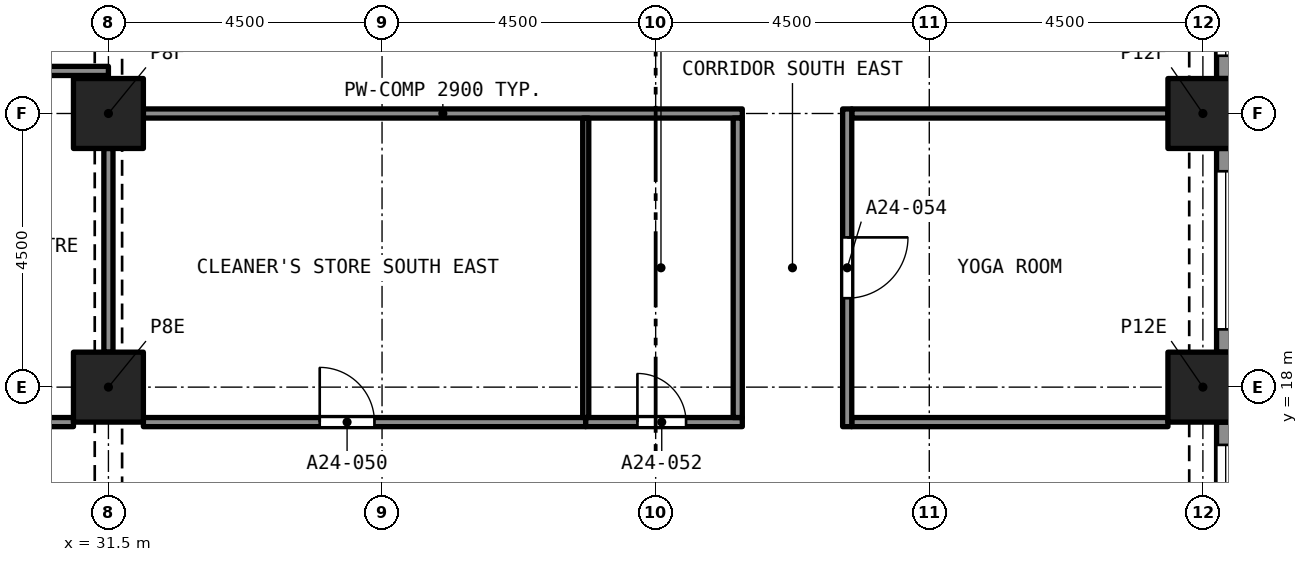
"""IFC4 building model, lengths in metres.
Left out: names, types, materials, properties, quantities, classifications, styles, units other than length and angle.
Written with IfcOpenShell. Run it as: python <this file> out.ifc"""

import sys

from ifc_helpers import new_model, si_unit, direction, frame, frame_2d, origin, origin_2d, place, context, subcontext, project, spatial, rectangle, extrude, element, fill, save


model = new_model("IFC4")
c1 = context("Model", 3, precision=1e-05, world=origin(), true_north=direction((0.0, 1.0)))
c2 = subcontext(c1, "Body", "Model", "MODEL_VIEW")
j1 = project(units=[si_unit("LENGTHUNIT", "METRE"), si_unit("PLANEANGLEUNIT", "RADIAN")], contexts=[c1])
p1 = place(None, origin())
s1 = spatial("IfcSite", under=j1, at=p1, CompositionType="ELEMENT")
p2 = place(p1, origin())
s2 = spatial("IfcBuilding", under=s1, at=p2, CompositionType="ELEMENT")
p3 = place(p2, frame((0.0, 0.0, 89.6)))
s3 = spatial("IfcBuildingStorey", under=s2, at=p3, CompositionType="ELEMENT", Elevation=89.6)
for number, where, z_axis, x_axis in (
    (1, (31.5, 18.0, 0.0), (0.0, 0.0, 1.0), (1.0, 0.0, 0.0)),
    (2, (49.5, 18.0, 0.0), (0.0, 0.0, 1.0), (1.0, 0.0, 0.0)),
    (3, (31.5, 22.5, 0.0), (0.0, 0.0, 1.0), (1.0, 0.0, 0.0)),
    (4, (49.5, 22.5, 0.0), (0.0, 0.0, 1.0), (1.0, 0.0, 0.0)),
):
    element("IfcColumn", number, at=place(p3, frame(where, z_axis=z_axis, x_axis=x_axis)), inside=s3, PredefinedType="COLUMN", context=c2, shape_type="SweptSolid", body=[
        extrude(rectangle(XDim=1.15, YDim=1.15, at=origin_2d()), origin(), (0.0, 0.0, 1.0), 3.2),
    ])
p4 = place(p3, frame((49.875, 17.425, 0.0), z_axis=(0.0, 0.0, 1.0), x_axis=(0.0, -1.0, 0.0)))
e5 = element("IfcWall", 5, at=p4, inside=s3, PredefinedType="SOLIDWALL", context=c2, shape_type="SweptSolid", body=[
    extrude(rectangle(XDim=3.35, YDim=0.3, at=frame_2d((1.675, 0.0))), origin(), (0.0, 0.0, 1.0), 3.2),
])
p5 = place(p4, frame((0.375, 0.0, 0.45)))
e6 = element("IfcOpeningElement", 6, at=p5, cuts=e5, PredefinedType="OPENING", context=c2, shape_type="SweptSolid", body=[
    extrude(rectangle(XDim=2.6, YDim=1.95, at=frame_2d((1.3, 0.975))), frame((0.0, 0.16, 0.0), z_axis=(0.0, -1.0, 0.0), x_axis=(1.0, 0.0, 0.0)), (0.0, 0.0, 1.0), 0.32),
])
p6 = place(p3, frame((49.875, 21.925, 0.0), z_axis=(0.0, 0.0, 1.0), x_axis=(0.0, -1.0, 0.0)))
e7 = element("IfcWall", 7, at=p6, inside=s3, PredefinedType="SOLIDWALL", context=c2, shape_type="SweptSolid", body=[
    extrude(rectangle(XDim=3.35, YDim=0.3, at=frame_2d((1.675, 0.0))), origin(), (0.0, 0.0, 1.0), 3.2),
])
p7 = place(p6, frame((0.375, 0.0, 0.45)))
e8 = element("IfcOpeningElement", 8, at=p7, cuts=e7, PredefinedType="OPENING", context=c2, shape_type="SweptSolid", body=[
    extrude(rectangle(XDim=2.6, YDim=1.95, at=frame_2d((1.3, 0.975))), frame((0.0, 0.16, 0.0), z_axis=(0.0, -1.0, 0.0), x_axis=(1.0, 0.0, 0.0)), (0.0, 0.0, 1.0), 0.32),
])
p8 = place(p3, frame((49.875, 26.425, 0.0), z_axis=(0.0, 0.0, 1.0), x_axis=(0.0, -1.0, 0.0)))
e9 = element("IfcWall", 9, at=p8, inside=s3, PredefinedType="SOLIDWALL", context=c2, shape_type="SweptSolid", body=[
    extrude(rectangle(XDim=3.35, YDim=0.3, at=frame_2d((1.675, 0.0))), origin(), (0.0, 0.0, 1.0), 3.2),
])
p9 = place(p8, frame((0.375, 0.0, 0.45)))
e10 = element("IfcOpeningElement", 10, at=p9, cuts=e9, PredefinedType="OPENING", context=c2, shape_type="SweptSolid", body=[
    extrude(rectangle(XDim=2.6, YDim=1.95, at=frame_2d((1.3, 0.975))), frame((0.0, 0.16, 0.0), z_axis=(0.0, -1.0, 0.0), x_axis=(1.0, 0.0, 0.0)), (0.0, 0.0, 1.0), 0.32),
])
p10 = place(p3, frame((25.725, 17.425, 0.0), z_axis=(0.0, 0.0, 1.0), x_axis=(1.0, 0.0, 0.0)))
e11 = element("IfcWall", 11, at=p10, inside=s3, PredefinedType="PARTITIONING", context=c2, shape_type="SweptSolid", body=[
    extrude(rectangle(XDim=5.2, YDim=0.15, at=frame_2d((2.6, 0.0))), origin(), (0.0, 0.0, 1.0), 2.75),
])
p11 = place(p3, frame((32.075, 17.425, 0.0), z_axis=(0.0, 0.0, 1.0), x_axis=(1.0, 0.0, 0.0)))
e12 = element("IfcWall", 12, at=p11, inside=s3, PredefinedType="PARTITIONING", context=c2, shape_type="SweptSolid", body=[
    extrude(rectangle(XDim=7.275, YDim=0.15, at=frame_2d((3.638, 0.0))), origin(), (0.0, 0.0, 1.0), 2.9),
])
p12 = place(p11, frame((2.9, 0.0, 0.0)))
e13 = element("IfcOpeningElement", 13, at=p12, cuts=e12, PredefinedType="OPENING", context=c2, shape_type="SweptSolid", body=[
    extrude(rectangle(XDim=0.9, YDim=2.1, at=frame_2d((0.45, 1.05))), frame((0.0, 0.085, 0.0), z_axis=(0.0, -1.0, 0.0), x_axis=(1.0, 0.0, 0.0)), (0.0, 0.0, 1.0), 0.17),
])
p13 = place(p3, frame((39.35, 17.425, 0.0), z_axis=(0.0, 0.0, 1.0), x_axis=(1.0, 0.0, 0.0)))
e14 = element("IfcWall", 14, at=p13, inside=s3, PredefinedType="PARTITIONING", context=c2, shape_type="SweptSolid", body=[
    extrude(rectangle(XDim=2.575, YDim=0.15, at=frame_2d((1.288, 0.0))), origin(), (0.0, 0.0, 1.0), 2.9),
])
p14 = place(p13, frame((0.85, 0.0, 0.0)))
e15 = element("IfcOpeningElement", 15, at=p14, cuts=e14, PredefinedType="OPENING", context=c2, shape_type="SweptSolid", body=[
    extrude(rectangle(XDim=0.8, YDim=2.1, at=frame_2d((0.4, 1.05))), frame((0.0, 0.085, 0.0), z_axis=(0.0, -1.0, 0.0), x_axis=(1.0, 0.0, 0.0)), (0.0, 0.0, 1.0), 0.17),
])
p15 = place(p3, frame((43.725, 17.425, 0.0), z_axis=(0.0, 0.0, 1.0), x_axis=(1.0, 0.0, 0.0)))
e16 = element("IfcWall", 16, at=p15, inside=s3, PredefinedType="PARTITIONING", context=c2, shape_type="SweptSolid", body=[
    extrude(rectangle(XDim=5.2, YDim=0.15, at=frame_2d((2.6, 0.0))), origin(), (0.0, 0.0, 1.0), 2.9),
])
p16 = place(p3, frame((25.725, 23.2, 0.0), z_axis=(0.0, 0.0, 1.0), x_axis=(1.0, 0.0, 0.0)))
e17 = element("IfcWall", 17, at=p16, inside=s3, PredefinedType="PARTITIONING", context=c2, shape_type="SweptSolid", body=[
    extrude(rectangle(XDim=5.775, YDim=0.15, at=frame_2d((2.887, 0.0))), origin(), (0.0, 0.0, 1.0), 2.75),
])
p17 = place(p3, frame((31.5, 18.575, 0.0), z_axis=(0.0, 0.0, 1.0), x_axis=(0.0, 1.0, 0.0)))
e18 = element("IfcWall", 18, at=p17, inside=s3, PredefinedType="PARTITIONING", context=c2, shape_type="SweptSolid", body=[
    extrude(rectangle(XDim=3.35, YDim=0.15, at=frame_2d((1.675, 0.0))), origin(), (0.0, 0.0, 1.0), 2.38),
])
p18 = place(p3, frame((32.075, 22.5, 0.0), z_axis=(0.0, 0.0, 1.0), x_axis=(1.0, 0.0, 0.0)))
e19 = element("IfcWall", 19, at=p18, inside=s3, PredefinedType="PARTITIONING", context=c2, shape_type="SweptSolid", body=[
    extrude(rectangle(XDim=9.85, YDim=0.15, at=frame_2d((4.925, 0.0))), origin(), (0.0, 0.0, 1.0), 2.9),
])
p19 = place(p3, frame((43.725, 22.5, 0.0), z_axis=(0.0, 0.0, 1.0), x_axis=(1.0, 0.0, 0.0)))
e20 = element("IfcWall", 20, at=p19, inside=s3, PredefinedType="PARTITIONING", context=c2, shape_type="SweptSolid", body=[
    extrude(rectangle(XDim=5.2, YDim=0.15, at=frame_2d((2.6, 0.0))), origin(), (0.0, 0.0, 1.0), 2.9),
])
p20 = place(p3, frame((41.85, 17.5, 0.0), z_axis=(0.0, 0.0, 1.0), x_axis=(0.0, 1.0, 0.0)))
e21 = element("IfcWall", 21, at=p20, inside=s3, PredefinedType="PARTITIONING", context=c2, shape_type="SweptSolid", body=[
    extrude(rectangle(XDim=4.925, YDim=0.15, at=frame_2d((2.462, 0.0))), origin(), (0.0, 0.0, 1.0), 2.9),
])
p21 = place(p3, frame((43.65, 22.575, 0.0), z_axis=(0.0, 0.0, 1.0), x_axis=(0.0, -1.0, 0.0)))
e22 = element("IfcWall", 22, at=p21, inside=s3, PredefinedType="PARTITIONING", context=c2, shape_type="SweptSolid", body=[
    extrude(rectangle(XDim=5.225, YDim=0.15, at=frame_2d((2.612, 0.0))), origin(), (0.0, 0.0, 1.0), 2.9),
])
p22 = place(p21, frame((2.113, 0.0, 0.0)))
e23 = element("IfcOpeningElement", 23, at=p22, cuts=e22, PredefinedType="OPENING", context=c2, shape_type="SweptSolid", body=[
    extrude(rectangle(XDim=1.0, YDim=2.1, at=frame_2d((0.5, 1.05))), frame((0.0, 0.085, 0.0), z_axis=(0.0, -1.0, 0.0), x_axis=(1.0, 0.0, 0.0)), (0.0, 0.0, 1.0), 0.17),
])
p23 = place(p3, frame((39.35, 17.5, 0.0), z_axis=(0.0, 0.0, 1.0), x_axis=(0.0, 1.0, 0.0)))
e24 = element("IfcWall", 24, at=p23, inside=s3, PredefinedType="PARTITIONING", context=c2, shape_type="SweptSolid", body=[
    extrude(rectangle(XDim=4.925, YDim=0.1, at=frame_2d((2.462, 0.0))), origin(), (0.0, 0.0, 1.0), 2.9),
])
p24 = place(p5, origin())
e25 = element("IfcWindow", 25, at=p24, inside=s3, PartitioningType="SINGLE_PANEL", PredefinedType="WINDOW", context=c2, shape_type="SweptSolid", body=[
    extrude(rectangle(XDim=2.6, YDim=1.95, at=frame_2d((1.3, 0.975))), frame((0.0, 0.03, 0.0), z_axis=(0.0, -1.0, 0.0), x_axis=(1.0, 0.0, 0.0)), (0.0, 0.0, 1.0), 0.06),
])
fill(e6, e25)
p25 = place(p7, origin())
e26 = element("IfcWindow", 26, at=p25, inside=s3, PartitioningType="SINGLE_PANEL", PredefinedType="WINDOW", context=c2, shape_type="SweptSolid", body=[
    extrude(rectangle(XDim=2.6, YDim=1.95, at=frame_2d((1.3, 0.975))), frame((0.0, 0.03, 0.0), z_axis=(0.0, -1.0, 0.0), x_axis=(1.0, 0.0, 0.0)), (0.0, 0.0, 1.0), 0.06),
])
fill(e8, e26)
p26 = place(p9, origin())
e27 = element("IfcWindow", 27, at=p26, inside=s3, PartitioningType="SINGLE_PANEL", PredefinedType="WINDOW", context=c2, shape_type="SweptSolid", body=[
    extrude(rectangle(XDim=2.6, YDim=1.95, at=frame_2d((1.3, 0.975))), frame((0.0, 0.03, 0.0), z_axis=(0.0, -1.0, 0.0), x_axis=(1.0, 0.0, 0.0)), (0.0, 0.0, 1.0), 0.06),
])
fill(e10, e27)
p27 = place(p12, origin())
e28 = element("IfcDoor", 28, at=p27, inside=s3, OperationType="SINGLE_SWING_LEFT", PredefinedType="DOOR", context=c2, shape_type="SweptSolid", body=[
    extrude(rectangle(XDim=0.9, YDim=2.1, at=frame_2d((0.45, 1.05))), frame((0.0, 0.025, 0.0), z_axis=(0.0, -1.0, 0.0), x_axis=(1.0, 0.0, 0.0)), (0.0, 0.0, 1.0), 0.05),
])
fill(e13, e28)
p28 = place(p14, origin())
e29 = element("IfcDoor", 29, at=p28, inside=s3, OperationType="SINGLE_SWING_LEFT", PredefinedType="DOOR", context=c2, shape_type="SweptSolid", body=[
    extrude(rectangle(XDim=0.8, YDim=2.1, at=frame_2d((0.4, 1.05))), frame((0.0, 0.025, 0.0), z_axis=(0.0, -1.0, 0.0), x_axis=(1.0, 0.0, 0.0)), (0.0, 0.0, 1.0), 0.05),
])
fill(e15, e29)
p29 = place(p22, origin())
e30 = element("IfcDoor", 30, at=p29, inside=s3, OperationType="SINGLE_SWING_RIGHT", PredefinedType="DOOR", context=c2, shape_type="SweptSolid", body=[
    extrude(rectangle(XDim=1.0, YDim=2.1, at=frame_2d((0.5, 1.05))), frame((0.0, 0.025, 0.0), z_axis=(0.0, -1.0, 0.0), x_axis=(1.0, 0.0, 0.0)), (0.0, 0.0, 1.0), 0.05),
])
fill(e23, e30)
save(model, sys.argv[1])
